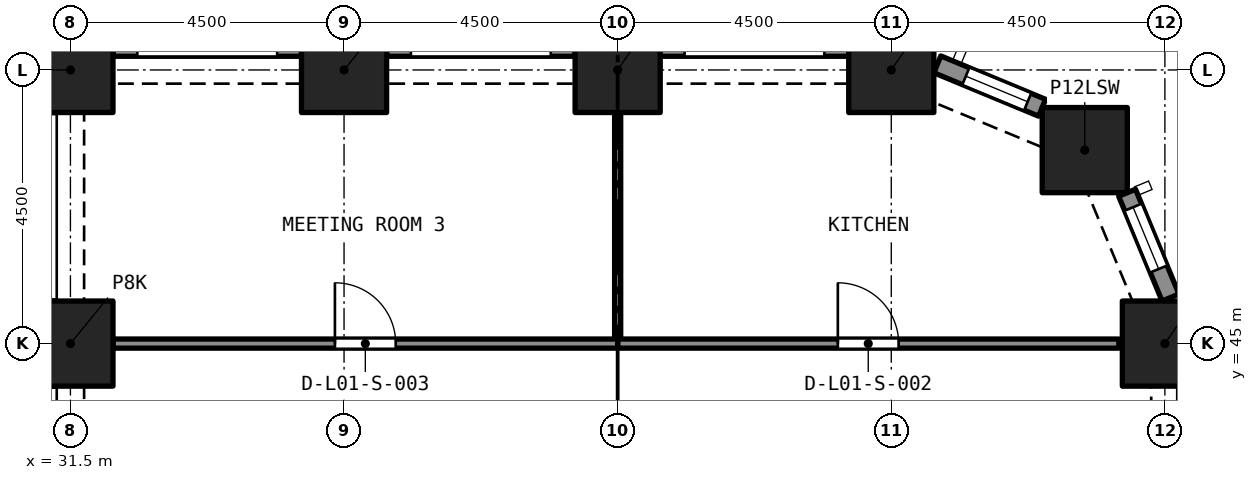
"""IFC4 building model, lengths in metres.
Left out: names, types, materials, properties, quantities, classifications, styles, units other than length and angle.
Written with IfcOpenShell. Run it as: python <this file> out.ifc"""

import sys

from ifc_helpers import new_model, si_unit, direction, frame, frame_2d, origin, origin_2d, place, context, subcontext, project, spatial, rectangle, extrude, element, fill, save


model = new_model("IFC4")
c1 = context("Model", 3, precision=1e-05, world=origin(), true_north=direction((0.0, 1.0)))
c2 = subcontext(c1, "Body", "Model", "MODEL_VIEW")
j1 = project(units=[si_unit("LENGTHUNIT", "METRE"), si_unit("PLANEANGLEUNIT", "RADIAN")], contexts=[c1])
p1 = place(None, origin())
s1 = spatial("IfcSite", under=j1, at=p1, CompositionType="ELEMENT")
p2 = place(p1, origin())
s2 = spatial("IfcBuilding", under=s1, at=p2, CompositionType="ELEMENT")
p3 = place(p2, frame((0.0, 0.0, 6.0)))
s3 = spatial("IfcBuildingStorey", under=s2, at=p3, CompositionType="ELEMENT", Elevation=6.0)
for number, where, z_axis, x_axis in (
    (1, (31.5, 45.0, 0.0), (0.0, 0.0, 1.0), (1.0, 0.0, 0.0)),
    (2, (49.5, 45.0, 0.0), (0.0, 0.0, 1.0), (1.0, 0.0, 0.0)),
    (3, (48.182, 48.182, 0.0), (0.0, 0.0, 1.0), (1.0, 0.0, 0.0)),
    (4, (31.5, 49.5, 0.0), (0.0, 0.0, 1.0), (1.0, 0.0, 0.0)),
    (5, (36.0, 49.5, 0.0), (0.0, 0.0, 1.0), (1.0, 0.0, 0.0)),
    (6, (40.5, 49.5, 0.0), (0.0, 0.0, 1.0), (1.0, 0.0, 0.0)),
    (7, (45.0, 49.5, 0.0), (0.0, 0.0, 1.0), (1.0, 0.0, 0.0)),
):
    element("IfcColumn", number, at=place(p3, frame(where, z_axis=z_axis, x_axis=x_axis)), inside=s3, PredefinedType="COLUMN", context=c2, shape_type="SweptSolid", body=[
        extrude(rectangle(XDim=1.4, YDim=1.4, at=origin_2d()), origin(), (0.0, 0.0, 1.0), 5.0),
    ])
p4 = place(p3, frame((48.878, 47.48, 0.0), z_axis=(0.0, 0.0, 1.0), x_axis=(0.38262540684, -0.923903565336, 0.0)))
e8 = element("IfcWall", 8, at=p4, inside=s3, PredefinedType="SOLIDWALL", context=c2, shape_type="SweptSolid", body=[
    extrude(rectangle(XDim=1.865, YDim=0.3, at=frame_2d((0.933, 0.0))), origin(), (0.0, 0.0, 1.0), 5.0),
])
p5 = place(p4, frame((0.258, 0.0, 0.45)))
e9 = element("IfcOpeningElement", 9, at=p5, cuts=e8, PredefinedType="OPENING", context=c2, shape_type="SweptSolid", body=[
    extrude(rectangle(XDim=1.1, YDim=3.3, at=frame_2d((0.55, 1.65))), frame((0.0, 0.16, 0.0), z_axis=(0.0, -1.0, 0.0), x_axis=(1.0, 0.0, 0.0)), (0.0, 0.0, 1.0), 0.32),
])
p6 = place(p3, frame((45.757, 49.592, 0.0), z_axis=(0.0, 0.0, 1.0), x_axis=(0.923857286003, -0.382737135771, 0.0)))
e10 = element("IfcWall", 10, at=p6, inside=s3, PredefinedType="SOLIDWALL", context=c2, shape_type="SweptSolid", body=[
    extrude(rectangle(XDim=1.865, YDim=0.3, at=frame_2d((0.933, 0.0))), origin(), (0.0, 0.0, 1.0), 5.0),
])
p7 = place(p6, frame((0.508, 0.0, 0.45)))
e11 = element("IfcOpeningElement", 11, at=p7, cuts=e10, PredefinedType="OPENING", context=c2, shape_type="SweptSolid", body=[
    extrude(rectangle(XDim=1.1, YDim=3.3, at=frame_2d((0.55, 1.65))), frame((0.0, 0.16, 0.0), z_axis=(0.0, -1.0, 0.0), x_axis=(1.0, 0.0, 0.0)), (0.0, 0.0, 1.0), 0.32),
])
p8 = place(p3, frame((41.2, 49.875, 0.0), z_axis=(0.0, 0.0, 1.0), x_axis=(1.0, 0.0, 0.0)))
e12 = element("IfcWall", 12, at=p8, inside=s3, PredefinedType="SOLIDWALL", context=c2, shape_type="SweptSolid", body=[
    extrude(rectangle(XDim=3.1, YDim=0.3, at=frame_2d((1.55, 0.0))), origin(), (0.0, 0.0, 1.0), 5.0),
])
p9 = place(p8, frame((0.4, 0.0, 0.45)))
e13 = element("IfcOpeningElement", 13, at=p9, cuts=e12, PredefinedType="OPENING", context=c2, shape_type="SweptSolid", body=[
    extrude(rectangle(XDim=2.3, YDim=3.3, at=frame_2d((1.15, 1.65))), frame((0.0, 0.16, 0.0), z_axis=(0.0, -1.0, 0.0), x_axis=(1.0, 0.0, 0.0)), (0.0, 0.0, 1.0), 0.32),
])
p10 = place(p3, frame((36.7, 49.875, 0.0), z_axis=(0.0, 0.0, 1.0), x_axis=(1.0, 0.0, 0.0)))
e14 = element("IfcWall", 14, at=p10, inside=s3, PredefinedType="SOLIDWALL", context=c2, shape_type="SweptSolid", body=[
    extrude(rectangle(XDim=3.1, YDim=0.3, at=frame_2d((1.55, 0.0))), origin(), (0.0, 0.0, 1.0), 5.0),
])
p11 = place(p10, frame((0.4, 0.0, 0.45)))
e15 = element("IfcOpeningElement", 15, at=p11, cuts=e14, PredefinedType="OPENING", context=c2, shape_type="SweptSolid", body=[
    extrude(rectangle(XDim=2.3, YDim=3.3, at=frame_2d((1.15, 1.65))), frame((0.0, 0.16, 0.0), z_axis=(0.0, -1.0, 0.0), x_axis=(1.0, 0.0, 0.0)), (0.0, 0.0, 1.0), 0.32),
])
p12 = place(p3, frame((32.2, 49.875, 0.0), z_axis=(0.0, 0.0, 1.0), x_axis=(1.0, 0.0, 0.0)))
e16 = element("IfcWall", 16, at=p12, inside=s3, PredefinedType="SOLIDWALL", context=c2, shape_type="SweptSolid", body=[
    extrude(rectangle(XDim=3.1, YDim=0.3, at=frame_2d((1.55, 0.0))), origin(), (0.0, 0.0, 1.0), 5.0),
])
p13 = place(p12, frame((0.4, 0.0, 0.45)))
e17 = element("IfcOpeningElement", 17, at=p13, cuts=e16, PredefinedType="OPENING", context=c2, shape_type="SweptSolid", body=[
    extrude(rectangle(XDim=2.3, YDim=3.3, at=frame_2d((1.15, 1.65))), frame((0.0, 0.16, 0.0), z_axis=(0.0, -1.0, 0.0), x_axis=(1.0, 0.0, 0.0)), (0.0, 0.0, 1.0), 0.32),
])
p14 = place(p3, frame((40.5, 45.075, 0.0), z_axis=(0.0, 0.0, 1.0), x_axis=(0.0, 1.0, 0.0)))
e18 = element("IfcWall", 18, at=p14, inside=s3, PredefinedType="PARTITIONING", context=c2, shape_type="SweptSolid", body=[
    extrude(rectangle(XDim=3.725, YDim=0.1, at=frame_2d((1.863, 0.0))), origin(), (0.0, 0.0, 1.0), 4.65),
])
p15 = place(p3, frame((40.5, 45.0, 0.0), z_axis=(0.0, 0.0, 1.0), x_axis=(1.0, 0.0, 0.0)))
e19 = element("IfcWall", 19, at=p15, inside=s3, PredefinedType="PARTITIONING", context=c2, shape_type="SweptSolid", body=[
    extrude(rectangle(XDim=8.242, YDim=0.15, at=frame_2d((4.121, 0.0))), origin(), (0.0, 0.0, 1.0), 4.65),
])
p16 = place(p15, frame((3.621, 0.0, 0.0)))
e20 = element("IfcOpeningElement", 20, at=p16, cuts=e19, PredefinedType="OPENING", context=c2, shape_type="SweptSolid", body=[
    extrude(rectangle(XDim=1.0, YDim=2.1, at=frame_2d((0.5, 1.05))), frame((0.0, 0.085, 0.0), z_axis=(0.0, -1.0, 0.0), x_axis=(1.0, 0.0, 0.0)), (0.0, 0.0, 1.0), 0.17),
])
p17 = place(p3, frame((32.2, 45.0, 0.0), z_axis=(0.0, 0.0, 1.0), x_axis=(1.0, 0.0, 0.0)))
e21 = element("IfcWall", 21, at=p17, inside=s3, PredefinedType="PARTITIONING", context=c2, shape_type="SweptSolid", body=[
    extrude(rectangle(XDim=8.3, YDim=0.15, at=frame_2d((4.15, 0.0))), origin(), (0.0, 0.0, 1.0), 4.65),
])
p18 = place(p17, frame((3.65, 0.0, 0.0)))
e22 = element("IfcOpeningElement", 22, at=p18, cuts=e21, PredefinedType="OPENING", context=c2, shape_type="SweptSolid", body=[
    extrude(rectangle(XDim=1.0, YDim=2.1, at=frame_2d((0.5, 1.05))), frame((0.0, 0.085, 0.0), z_axis=(0.0, -1.0, 0.0), x_axis=(1.0, 0.0, 0.0)), (0.0, 0.0, 1.0), 0.17),
])
p19 = place(p5, origin())
e23 = element("IfcWindow", 23, at=p19, inside=s3, PartitioningType="SINGLE_PANEL", PredefinedType="WINDOW", context=c2, shape_type="SweptSolid", body=[
    extrude(rectangle(XDim=1.1, YDim=3.3, at=frame_2d((0.55, 1.65))), frame((0.0, 0.03, 0.0), z_axis=(0.0, -1.0, 0.0), x_axis=(1.0, 0.0, 0.0)), (0.0, 0.0, 1.0), 0.06),
])
fill(e9, e23)
p20 = place(p7, origin())
e24 = element("IfcWindow", 24, at=p20, inside=s3, PartitioningType="SINGLE_PANEL", PredefinedType="WINDOW", context=c2, shape_type="SweptSolid", body=[
    extrude(rectangle(XDim=1.1, YDim=3.3, at=frame_2d((0.55, 1.65))), frame((0.0, 0.03, 0.0), z_axis=(0.0, -1.0, 0.0), x_axis=(1.0, 0.0, 0.0)), (0.0, 0.0, 1.0), 0.06),
])
fill(e11, e24)
p21 = place(p16, origin())
e25 = element("IfcDoor", 25, at=p21, inside=s3, OperationType="SINGLE_SWING_RIGHT", PredefinedType="DOOR", context=c2, shape_type="SweptSolid", body=[
    extrude(rectangle(XDim=1.0, YDim=2.1, at=frame_2d((0.5, 1.05))), frame((0.0, 0.025, 0.0), z_axis=(0.0, -1.0, 0.0), x_axis=(1.0, 0.0, 0.0)), (0.0, 0.0, 1.0), 0.05),
])
fill(e20, e25)
p22 = place(p18, origin())
e26 = element("IfcDoor", 26, at=p22, inside=s3, OperationType="SINGLE_SWING_RIGHT", PredefinedType="DOOR", context=c2, shape_type="SweptSolid", body=[
    extrude(rectangle(XDim=1.0, YDim=2.1, at=frame_2d((0.5, 1.05))), frame((0.0, 0.025, 0.0), z_axis=(0.0, -1.0, 0.0), x_axis=(1.0, 0.0, 0.0)), (0.0, 0.0, 1.0), 0.05),
])
fill(e22, e26)
save(model, sys.argv[1])
